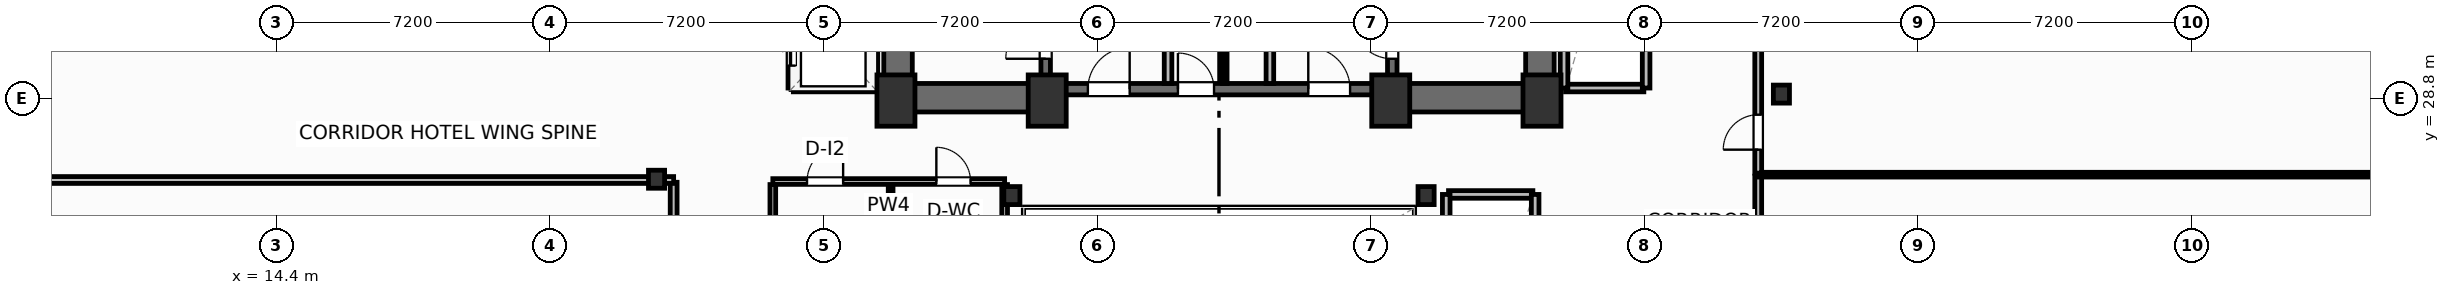
"""IFC4 building model, lengths in metres.
Left out: names, types, materials, properties, quantities, classifications, styles, units other than length and angle.
Written with IfcOpenShell. Run it as: python <this file> out.ifc"""

import sys

from ifc_helpers import new_model, si_unit, direction, frame, frame_2d, origin, origin_2d, place, context, subcontext, project, spatial, rectangle, i_section, extrude, element, fill, save


model = new_model("IFC4")
c1 = context("Model", 3, precision=1e-05, world=origin(), true_north=direction((0.0, 1.0)))
c2 = subcontext(c1, "Body", "Model", "MODEL_VIEW")
j1 = project(units=[si_unit("LENGTHUNIT", "METRE"), si_unit("PLANEANGLEUNIT", "RADIAN")], contexts=[c1])
p1 = place(None, origin())
s1 = spatial("IfcSite", under=j1, at=p1, CompositionType="ELEMENT")
p2 = place(p1, origin())
s2 = spatial("IfcBuilding", under=s1, at=p2, CompositionType="ELEMENT")
p3 = place(p2, frame((0.0, 0.0, 102.1)))
s3 = spatial("IfcBuildingStorey", under=s2, at=p3, CompositionType="ELEMENT", Elevation=102.1)
for number, where, z_axis, x_axis in (
    (1, (30.7, 28.75, 0.0), (0.0, 0.0, 1.0), (1.0, 0.0, 0.0)),
    (2, (34.68, 28.75, 0.0), (0.0, 0.0, 1.0), (1.0, 0.0, 0.0)),
    (3, (43.72, 28.75, 0.0), (0.0, 0.0, 1.0), (1.0, 0.0, 0.0)),
    (4, (47.7, 28.75, 0.0), (0.0, 0.0, 1.0), (1.0, 0.0, 0.0)),
):
    element("IfcColumn", number, at=place(p3, frame(where, z_axis=z_axis, x_axis=x_axis)), inside=s3, PredefinedType="COLUMN", context=c2, shape_type="SweptSolid", body=[
        extrude(rectangle(XDim=1.0, YDim=1.35, at=origin_2d()), origin(), (0.0, 0.0, 1.0), 3.7),
    ])
for number, where, z_axis, x_axis in (
    (5, (33.75, 26.25, 0.0), (0.0, 0.0, 1.0), (1.0, 0.0, 0.0)),
    (6, (44.65, 26.25, 0.0), (0.0, 0.0, 1.0), (1.0, 0.0, 0.0)),
    (7, (24.4, 26.68, 0.0), (0.0, 0.0, 1.0), (1.0, 0.0, 0.0)),
    (8, (54.0, 28.92, 0.0), (0.0, 0.0, 1.0), (1.0, 0.0, 0.0)),
):
    element("IfcColumn", number, at=place(p3, frame(where, z_axis=z_axis, x_axis=x_axis)), inside=s3, PredefinedType="COLUMN", context=c2, shape_type="SweptSolid", body=[
        extrude(i_section(OverallWidth=0.424, OverallDepth=0.474, WebThickness=0.048, FlangeThickness=0.077, FilletRadius=0.025, at=origin_2d()), origin(), (0.0, 0.0, 1.0), 3.7),
    ])
for number, where, z_axis, x_axis in (
    (9, (30.755, 29.2, 0.0), (0.0, 0.0, 1.0), (0.0, 1.0, 0.0)),
    (10, (47.645, 29.2, 0.0), (0.0, 0.0, 1.0), (0.0, 1.0, 0.0)),
):
    element("IfcWall", number, at=place(p3, frame(where, z_axis=z_axis, x_axis=x_axis)), inside=s3, PredefinedType="SHEAR", context=c2, shape_type="SweptSolid", body=[
        extrude(rectangle(XDim=9.22, YDim=0.75, at=frame_2d((4.61, 0.0))), origin(), (0.0, 0.0, 1.0), 3.45),
    ])
p4 = place(p3, frame((30.38, 28.825, 0.0), z_axis=(0.0, 0.0, 1.0), x_axis=(1.0, 0.0, 0.0)))
e11 = element("IfcWall", 11, at=p4, inside=s3, PredefinedType="SHEAR", context=c2, shape_type="SweptSolid", body=[
    extrude(rectangle(XDim=4.42, YDim=0.75, at=frame_2d((2.21, 0.0))), origin(), (0.0, 0.0, 1.0), 3.45),
])
p5 = place(p3, frame((43.6, 28.825, 0.0), z_axis=(0.0, 0.0, 1.0), x_axis=(1.0, 0.0, 0.0)))
e12 = element("IfcWall", 12, at=p5, inside=s3, PredefinedType="SHEAR", context=c2, shape_type="SweptSolid", body=[
    extrude(rectangle(XDim=4.42, YDim=0.75, at=frame_2d((2.21, 0.0))), origin(), (0.0, 0.0, 1.0), 3.45),
])
p6 = place(p3, frame((34.8, 29.05, 0.0), z_axis=(0.0, 0.0, 1.0), x_axis=(1.0, 0.0, 0.0)))
e13 = element("IfcWall", 13, at=p6, inside=s3, PredefinedType="SHEAR", context=c2, shape_type="SweptSolid", body=[
    extrude(rectangle(XDim=8.8, YDim=0.3, at=frame_2d((4.4, 0.0))), origin(), (0.0, 0.0, 1.0), 3.45),
])
p7 = place(p6, frame((0.95, 0.0, 0.0)))
e14 = element("IfcOpeningElement", 14, at=p7, cuts=e13, PredefinedType="OPENING", context=c2, shape_type="SweptSolid", body=[
    extrude(rectangle(XDim=1.1, YDim=2.15, at=frame_2d((0.55, 1.075))), frame((0.0, 0.16, 0.0), z_axis=(0.0, -1.0, 0.0), x_axis=(1.0, 0.0, 0.0)), (0.0, 0.0, 1.0), 0.32),
])
p8 = place(p6, frame((6.75, 0.0, 0.0)))
e15 = element("IfcOpeningElement", 15, at=p8, cuts=e13, PredefinedType="OPENING", context=c2, shape_type="SweptSolid", body=[
    extrude(rectangle(XDim=1.1, YDim=2.15, at=frame_2d((0.55, 1.075))), frame((0.0, 0.16, 0.0), z_axis=(0.0, -1.0, 0.0), x_axis=(1.0, 0.0, 0.0)), (0.0, 0.0, 1.0), 0.32),
])
p9 = place(p6, frame((3.32, 0.0, 0.0)))
e16 = element("IfcOpeningElement", 16, at=p9, cuts=e13, PredefinedType="OPENING", context=c2, shape_type="SweptSolid", body=[
    extrude(rectangle(XDim=0.95, YDim=2.15, at=frame_2d((0.475, 1.075))), frame((0.0, 0.16, 0.0), z_axis=(0.0, -1.0, 0.0), x_axis=(1.0, 0.0, 0.0)), (0.0, 0.0, 1.0), 0.32),
])
p10 = place(p3, frame((34.64, 29.2, 0.0), z_axis=(0.0, 0.0, 1.0), x_axis=(0.0, 1.0, 0.0)))
e17 = element("IfcWall", 17, at=p10, inside=s3, PredefinedType="SHEAR", context=c2, shape_type="SweptSolid", body=[
    extrude(rectangle(XDim=9.22, YDim=0.25, at=frame_2d((4.61, 0.0))), origin(), (0.0, 0.0, 1.0), 3.45),
])
p11 = place(p10, frame((0.65, 0.0, 0.0)))
e18 = element("IfcOpeningElement", 18, at=p11, cuts=e17, PredefinedType="OPENING", context=c2, shape_type="SweptSolid", body=[
    extrude(rectangle(XDim=1.05, YDim=2.15, at=frame_2d((0.525, 1.075))), frame((0.0, 0.135, 0.0), z_axis=(0.0, -1.0, 0.0), x_axis=(1.0, 0.0, 0.0)), (0.0, 0.0, 1.0), 0.27),
])
p12 = place(p3, frame((43.76, 29.2, 0.0), z_axis=(0.0, 0.0, 1.0), x_axis=(0.0, 1.0, 0.0)))
e19 = element("IfcWall", 19, at=p12, inside=s3, PredefinedType="SHEAR", context=c2, shape_type="SweptSolid", body=[
    extrude(rectangle(XDim=9.22, YDim=0.25, at=frame_2d((4.61, 0.0))), origin(), (0.0, 0.0, 1.0), 3.45),
])
p13 = place(p12, frame((0.65, 0.0, 0.0)))
e20 = element("IfcOpeningElement", 20, at=p13, cuts=e19, PredefinedType="OPENING", context=c2, shape_type="SweptSolid", body=[
    extrude(rectangle(XDim=1.05, YDim=2.15, at=frame_2d((0.525, 1.075))), frame((0.0, 0.135, 0.0), z_axis=(0.0, -1.0, 0.0), x_axis=(1.0, 0.0, 0.0)), (0.0, 0.0, 1.0), 0.27),
])
p14 = place(p3, frame((24.85, 23.03, 0.0), z_axis=(0.0, 0.0, 1.0), x_axis=(0.0, 1.0, 0.0)))
e21 = element("IfcWall", 21, at=p14, inside=s3, PredefinedType="PARTITIONING", context=c2, shape_type="SweptSolid", body=[
    extrude(rectangle(XDim=3.57, YDim=0.18, at=frame_2d((1.785, 0.0))), origin(), (0.0, 0.0, 1.0), 3.45),
])
p15 = place(p14, frame((1.5, 0.0, 0.0)))
e22 = element("IfcOpeningElement", 22, at=p15, cuts=e21, PredefinedType="OPENING", context=c2, shape_type="SweptSolid", body=[
    extrude(rectangle(XDim=0.92, YDim=2.05, at=frame_2d((0.46, 1.025))), frame((0.0, 0.1, 0.0), z_axis=(0.0, -1.0, 0.0), x_axis=(1.0, 0.0, 0.0)), (0.0, 0.0, 1.0), 0.2),
])
p16 = place(p3, frame((-0.086, 26.66, 0.0), z_axis=(0.0, 0.0, 1.0), x_axis=(1.0, 0.0, 0.0)))
e23 = element("IfcWall", 23, at=p16, inside=s3, PredefinedType="PARTITIONING", context=c2, shape_type="SweptSolid", body=[
    extrude(rectangle(XDim=24.936, YDim=0.18, at=frame_2d((12.468, 0.0))), origin(), (0.0, 0.0, 1.0), 2.662),
])
p17 = place(p3, frame((53.39, 19.24, 0.0), z_axis=(0.0, 0.0, 1.0), x_axis=(0.0, 1.0, 0.0)))
e24 = element("IfcWall", 24, at=p17, inside=s3, PredefinedType="PARTITIONING", context=c2, shape_type="SweptSolid", body=[
    extrude(rectangle(XDim=7.52, YDim=0.18, at=frame_2d((3.76, 0.0))), origin(), (0.0, 0.0, 1.0), 3.45),
])
p18 = place(p17, frame((2.1, 0.0, 0.0)))
e25 = element("IfcOpeningElement", 25, at=p18, cuts=e24, PredefinedType="OPENING", context=c2, shape_type="SweptSolid", body=[
    extrude(rectangle(XDim=0.92, YDim=2.05, at=frame_2d((0.46, 1.025))), frame((0.0, 0.1, 0.0), z_axis=(0.0, -1.0, 0.0), x_axis=(1.0, 0.0, 0.0)), (0.0, 0.0, 1.0), 0.2),
])
p19 = place(p3, frame((53.39, 26.8, 0.0), z_axis=(0.0, 0.0, 1.0), x_axis=(1.0, 0.0, 0.0)))
e26 = element("IfcWall", 26, at=p19, inside=s3, PredefinedType="PARTITIONING", context=c2, shape_type="SweptSolid", body=[
    extrude(rectangle(XDim=23.61, YDim=0.125, at=frame_2d((11.805, 0.0))), origin(), (0.0, 0.0, 1.0), 3.45),
])
p20 = place(p3, frame((53.39, 26.84, 0.0), z_axis=(0.0, 0.0, 1.0), x_axis=(0.0, 1.0, 0.0)))
e27 = element("IfcWall", 27, at=p20, inside=s3, PredefinedType="PARTITIONING", context=c2, shape_type="SweptSolid", body=[
    extrude(rectangle(XDim=12.46, YDim=0.18, at=frame_2d((6.23, 0.0))), origin(), (0.0, 0.0, 1.0), 3.45),
])
p21 = place(p20, frame((0.618, 0.0, 0.0)))
e28 = element("IfcOpeningElement", 28, at=p21, cuts=e27, PredefinedType="OPENING", context=c2, shape_type="SweptSolid", body=[
    extrude(rectangle(XDim=0.92, YDim=2.05, at=frame_2d((0.46, 1.025))), frame((0.0, 0.1, 0.0), z_axis=(0.0, -1.0, 0.0), x_axis=(1.0, 0.0, 0.0)), (0.0, 0.0, 1.0), 0.2),
])
for number, where, z_axis, x_axis in (
    (29, (37.86, 29.2, 0.0), (0.0, 0.0, 1.0), (0.0, 1.0, 0.0)),
    (30, (40.54, 29.2, 0.0), (0.0, 0.0, 1.0), (0.0, 1.0, 0.0)),
):
    element("IfcWall", number, at=place(p3, frame(where, z_axis=z_axis, x_axis=x_axis)), inside=s3, PredefinedType="PARTITIONING", context=c2, shape_type="SweptSolid", body=[
        extrude(rectangle(XDim=5.18, YDim=0.2, at=frame_2d((2.59, 0.0))), origin(), (0.0, 0.0, 1.0), 3.45),
    ])
p22 = place(p3, frame((39.35, 29.2, 0.0), z_axis=(0.0, 0.0, 1.0), x_axis=(0.0, 1.0, 0.0)))
e31 = element("IfcWall", 31, at=p22, inside=s3, PredefinedType="PARTITIONING", context=c2, shape_type="SweptSolid", body=[
    extrude(rectangle(XDim=5.22, YDim=0.125, at=frame_2d((2.61, 0.0))), origin(), (0.0, 0.0, 1.0), 3.45),
])
p23 = place(p22, frame((2.05, 0.0, 0.0)))
e32 = element("IfcOpeningElement", 32, at=p23, cuts=e31, PredefinedType="OPENING", context=c2, shape_type="SweptSolid", body=[
    extrude(rectangle(XDim=0.85, YDim=2.05, at=frame_2d((0.425, 1.025))), frame((0.0, 0.073, 0.0), z_axis=(0.0, -1.0, 0.0), x_axis=(1.0, 0.0, 0.0)), (0.0, 0.0, 1.0), 0.145),
])
p24 = place(p3, frame((27.46, 26.62, 0.0), z_axis=(0.0, 0.0, 1.0), x_axis=(1.0, 0.0, 0.0)))
e33 = element("IfcWall", 33, at=p24, inside=s3, PredefinedType="PARTITIONING", context=c2, shape_type="SweptSolid", body=[
    extrude(rectangle(XDim=6.1, YDim=0.15, at=frame_2d((3.05, 0.0))), origin(), (0.0, 0.0, 1.0), 2.662),
])
p25 = place(p24, frame((0.9, 0.0, 0.0)))
e34 = element("IfcOpeningElement", 34, at=p25, cuts=e33, PredefinedType="OPENING", context=c2, shape_type="SweptSolid", body=[
    extrude(rectangle(XDim=0.95, YDim=2.05, at=frame_2d((0.475, 1.025))), frame((0.0, 0.085, 0.0), z_axis=(0.0, -1.0, 0.0), x_axis=(1.0, 0.0, 0.0)), (0.0, 0.0, 1.0), 0.17),
])
p26 = place(p24, frame((4.303, 0.0, 0.0)))
e35 = element("IfcOpeningElement", 35, at=p26, cuts=e33, PredefinedType="OPENING", context=c2, shape_type="SweptSolid", body=[
    extrude(rectangle(XDim=0.9, YDim=2.05, at=frame_2d((0.45, 1.025))), frame((0.0, 0.085, 0.0), z_axis=(0.0, -1.0, 0.0), x_axis=(1.0, 0.0, 0.0)), (0.0, 0.0, 1.0), 0.17),
])
p27 = place(p3, frame((30.56, 19.38, 0.0), z_axis=(0.0, 0.0, 1.0), x_axis=(0.0, 1.0, 0.0)))
e36 = element("IfcWall", 36, at=p27, inside=s3, PredefinedType="PARTITIONING", context=c2, shape_type="SweptSolid", body=[
    extrude(rectangle(XDim=7.16, YDim=0.125, at=frame_2d((3.58, 0.0))), origin(), (0.0, 0.0, 1.0), 3.45),
])
p28 = place(p27, frame((1.4, 0.0, 0.0)))
e37 = element("IfcOpeningElement", 37, at=p28, cuts=e36, PredefinedType="OPENING", context=c2, shape_type="SweptSolid", body=[
    extrude(rectangle(XDim=0.92, YDim=2.05, at=frame_2d((0.46, 1.025))), frame((0.0, 0.073, 0.0), z_axis=(0.0, -1.0, 0.0), x_axis=(1.0, 0.0, 0.0)), (0.0, 0.0, 1.0), 0.145),
])
p29 = place(p3, frame((27.46, 19.38, 0.0), z_axis=(0.0, 0.0, 1.0), x_axis=(0.0, 1.0, 0.0)))
e38 = element("IfcWall", 38, at=p29, inside=s3, PredefinedType="PARTITIONING", context=c2, shape_type="SweptSolid", body=[
    extrude(rectangle(XDim=7.16, YDim=0.15, at=frame_2d((3.58, 0.0))), origin(), (0.0, 0.0, 1.0), 3.45),
])
p30 = place(p3, frame((33.56, 19.38, 0.0), z_axis=(0.0, 0.0, 1.0), x_axis=(0.0, 1.0, 0.0)))
e39 = element("IfcWall", 39, at=p30, inside=s3, PredefinedType="PARTITIONING", context=c2, shape_type="SweptSolid", body=[
    extrude(rectangle(XDim=7.16, YDim=0.15, at=frame_2d((3.58, 0.0))), origin(), (0.0, 0.0, 1.0), 2.824),
])
p31 = place(p3, frame((28.0, 29.08, 0.0), z_axis=(0.0, 0.0, 1.0), x_axis=(1.0, 0.0, 0.0)))
e40 = element("IfcWall", 40, at=p31, inside=s3, PredefinedType="PARTITIONING", context=c2, shape_type="SweptSolid", body=[
    extrude(rectangle(XDim=2.1, YDim=0.2, at=frame_2d((1.05, 0.0))), origin(), (0.0, 0.0, 1.0), 3.45),
])
p32 = place(p3, frame((30.12, 29.08, 0.0), z_axis=(0.0, 0.0, 1.0), x_axis=(0.0, 1.0, 0.0)))
e41 = element("IfcWall", 41, at=p32, inside=s3, PredefinedType="PARTITIONING", context=c2, shape_type="SweptSolid", body=[
    extrude(rectangle(XDim=6.89, YDim=0.2, at=frame_2d((3.445, 0.0))), origin(), (0.0, 0.0, 1.0), 3.45),
])
p33 = place(p3, frame((27.96, 29.08, 0.0), z_axis=(0.0, 0.0, 1.0), x_axis=(0.0, 1.0, 0.0)))
e42 = element("IfcWall", 42, at=p33, inside=s3, PredefinedType="PARTITIONING", context=c2, shape_type="SweptSolid", body=[
    extrude(rectangle(XDim=6.89, YDim=0.2, at=frame_2d((3.445, 0.0))), origin(), (0.0, 0.0, 1.0), 3.45),
])
p34 = place(p33, frame((0.59, 0.0, 0.0)))
e43 = element("IfcOpeningElement", 43, at=p34, cuts=e42, PredefinedType="OPENING", context=c2, shape_type="SweptSolid", body=[
    extrude(rectangle(XDim=1.1, YDim=2.15, at=frame_2d((0.55, 1.075))), frame((0.0, 0.11, 0.0), z_axis=(0.0, -1.0, 0.0), x_axis=(1.0, 0.0, 0.0)), (0.0, 0.0, 1.0), 0.22),
])
p35 = place(p33, frame((2.89, 0.0, 0.0)))
e44 = element("IfcOpeningElement", 44, at=p35, cuts=e42, PredefinedType="OPENING", context=c2, shape_type="SweptSolid", body=[
    extrude(rectangle(XDim=1.1, YDim=2.15, at=frame_2d((0.55, 1.075))), frame((0.0, 0.11, 0.0), z_axis=(0.0, -1.0, 0.0), x_axis=(1.0, 0.0, 0.0)), (0.0, 0.0, 1.0), 0.22),
])
p36 = place(p33, frame((5.19, 0.0, 0.0)))
e45 = element("IfcOpeningElement", 45, at=p36, cuts=e42, PredefinedType="OPENING", context=c2, shape_type="SweptSolid", body=[
    extrude(rectangle(XDim=1.1, YDim=2.15, at=frame_2d((0.55, 1.075))), frame((0.0, 0.11, 0.0), z_axis=(0.0, -1.0, 0.0), x_axis=(1.0, 0.0, 0.0)), (0.0, 0.0, 1.0), 0.22),
])
p37 = place(p3, frame((48.32, 29.08, 0.0), z_axis=(0.0, 0.0, 1.0), x_axis=(1.0, 0.0, 0.0)))
e46 = element("IfcWall", 46, at=p37, inside=s3, PredefinedType="PARTITIONING", context=c2, shape_type="SweptSolid", body=[
    extrude(rectangle(XDim=2.06, YDim=0.2, at=frame_2d((1.03, 0.0))), origin(), (0.0, 0.0, 1.0), 2.662),
])
for number, where, z_axis, x_axis in (
    (47, (48.28, 29.08, 0.0), (0.0, 0.0, 1.0), (0.0, 1.0, 0.0)),
    (48, (50.44, 29.08, 0.0), (0.0, 0.0, 1.0), (0.0, 1.0, 0.0)),
):
    element("IfcWall", number, at=place(p3, frame(where, z_axis=z_axis, x_axis=x_axis)), inside=s3, PredefinedType="PARTITIONING", context=c2, shape_type="SweptSolid", body=[
        extrude(rectangle(XDim=6.89, YDim=0.2, at=frame_2d((3.445, 0.0))), origin(), (0.0, 0.0, 1.0), 3.45),
    ])
p38 = place(p3, frame((45.24, 26.28, 0.0), z_axis=(0.0, 0.0, 1.0), x_axis=(1.0, 0.0, 0.0)))
e49 = element("IfcWall", 49, at=p38, inside=s3, PredefinedType="PARTITIONING", context=c2, shape_type="SweptSolid", body=[
    extrude(rectangle(XDim=2.22, YDim=0.2, at=frame_2d((1.11, 0.0))), origin(), (0.0, 0.0, 1.0), 3.45),
])
for number, where, z_axis, x_axis in (
    (50, (45.18, 19.38, 0.0), (0.0, 0.0, 1.0), (0.0, 1.0, 0.0)),
    (51, (47.52, 19.38, 0.0), (0.0, 0.0, 1.0), (0.0, 1.0, 0.0)),
):
    element("IfcWall", number, at=place(p3, frame(where, z_axis=z_axis, x_axis=x_axis)), inside=s3, PredefinedType="PARTITIONING", context=c2, shape_type="SweptSolid", body=[
        extrude(rectangle(XDim=6.9, YDim=0.2, at=frame_2d((3.45, 0.0))), origin(), (0.0, 0.0, 1.0), 3.45),
    ])
p39 = place(p21, origin())
e52 = element("IfcDoor", 52, at=p39, inside=s3, OperationType="SINGLE_SWING_LEFT", PredefinedType="DOOR", context=c2, shape_type="SweptSolid", body=[
    extrude(rectangle(XDim=0.92, YDim=2.05, at=frame_2d((0.46, 1.025))), frame((0.0, 0.025, 0.0), z_axis=(0.0, -1.0, 0.0), x_axis=(1.0, 0.0, 0.0)), (0.0, 0.0, 1.0), 0.05),
])
fill(e28, e52)
p40 = place(p11, origin())
e53 = element("IfcDoor", 53, at=p40, inside=s3, OperationType="SINGLE_SWING_LEFT", PredefinedType="DOOR", context=c2, shape_type="SweptSolid", body=[
    extrude(rectangle(XDim=1.05, YDim=2.15, at=frame_2d((0.525, 1.075))), frame((0.0, 0.025, 0.0), z_axis=(0.0, -1.0, 0.0), x_axis=(1.0, 0.0, 0.0)), (0.0, 0.0, 1.0), 0.05),
])
fill(e18, e53)
p41 = place(p13, origin())
e54 = element("IfcDoor", 54, at=p41, inside=s3, OperationType="SINGLE_SWING_RIGHT", PredefinedType="DOOR", context=c2, shape_type="SweptSolid", body=[
    extrude(rectangle(XDim=1.05, YDim=2.15, at=frame_2d((0.525, 1.075))), frame((0.0, 0.025, 0.0), z_axis=(0.0, -1.0, 0.0), x_axis=(1.0, 0.0, 0.0)), (0.0, 0.0, 1.0), 0.05),
])
fill(e20, e54)
p42 = place(p7, origin())
e55 = element("IfcDoor", 55, at=p42, inside=s3, OperationType="SINGLE_SWING_RIGHT", PredefinedType="DOOR", context=c2, shape_type="SweptSolid", body=[
    extrude(rectangle(XDim=1.1, YDim=2.15, at=frame_2d((0.55, 1.075))), frame((0.0, 0.025, 0.0), z_axis=(0.0, -1.0, 0.0), x_axis=(1.0, 0.0, 0.0)), (0.0, 0.0, 1.0), 0.05),
])
fill(e14, e55)
p43 = place(p8, origin())
e56 = element("IfcDoor", 56, at=p43, inside=s3, OperationType="SINGLE_SWING_LEFT", PredefinedType="DOOR", context=c2, shape_type="SweptSolid", body=[
    extrude(rectangle(XDim=1.1, YDim=2.15, at=frame_2d((0.55, 1.075))), frame((0.0, 0.025, 0.0), z_axis=(0.0, -1.0, 0.0), x_axis=(1.0, 0.0, 0.0)), (0.0, 0.0, 1.0), 0.05),
])
fill(e15, e56)
p44 = place(p9, origin())
e57 = element("IfcDoor", 57, at=p44, inside=s3, OperationType="SINGLE_SWING_LEFT", PredefinedType="DOOR", context=c2, shape_type="SweptSolid", body=[
    extrude(rectangle(XDim=0.95, YDim=2.15, at=frame_2d((0.475, 1.075))), frame((0.0, 0.025, 0.0), z_axis=(0.0, -1.0, 0.0), x_axis=(1.0, 0.0, 0.0)), (0.0, 0.0, 1.0), 0.05),
])
fill(e16, e57)
p45 = place(p25, origin())
e58 = element("IfcDoor", 58, at=p45, inside=s3, OperationType="SINGLE_SWING_RIGHT", PredefinedType="DOOR", context=c2, shape_type="SweptSolid", body=[
    extrude(rectangle(XDim=0.95, YDim=2.05, at=frame_2d((0.475, 1.025))), frame((0.0, 0.025, 0.0), z_axis=(0.0, -1.0, 0.0), x_axis=(1.0, 0.0, 0.0)), (0.0, 0.0, 1.0), 0.05),
])
fill(e34, e58)
p46 = place(p26, origin())
e59 = element("IfcDoor", 59, at=p46, inside=s3, OperationType="SINGLE_SWING_LEFT", PredefinedType="DOOR", context=c2, shape_type="SweptSolid", body=[
    extrude(rectangle(XDim=0.9, YDim=2.05, at=frame_2d((0.45, 1.025))), frame((0.0, 0.025, 0.0), z_axis=(0.0, -1.0, 0.0), x_axis=(1.0, 0.0, 0.0)), (0.0, 0.0, 1.0), 0.05),
])
fill(e35, e59)
p47 = place(p34, origin())
e60 = element("IfcDoor", 60, at=p47, inside=s3, OperationType="SLIDING_TO_LEFT", PredefinedType="DOOR", context=c2, shape_type="SweptSolid", body=[
    extrude(rectangle(XDim=1.1, YDim=2.15, at=frame_2d((0.55, 1.075))), frame((0.0, 0.025, 0.0), z_axis=(0.0, -1.0, 0.0), x_axis=(1.0, 0.0, 0.0)), (0.0, 0.0, 1.0), 0.05),
])
fill(e43, e60)
save(model, sys.argv[1])
